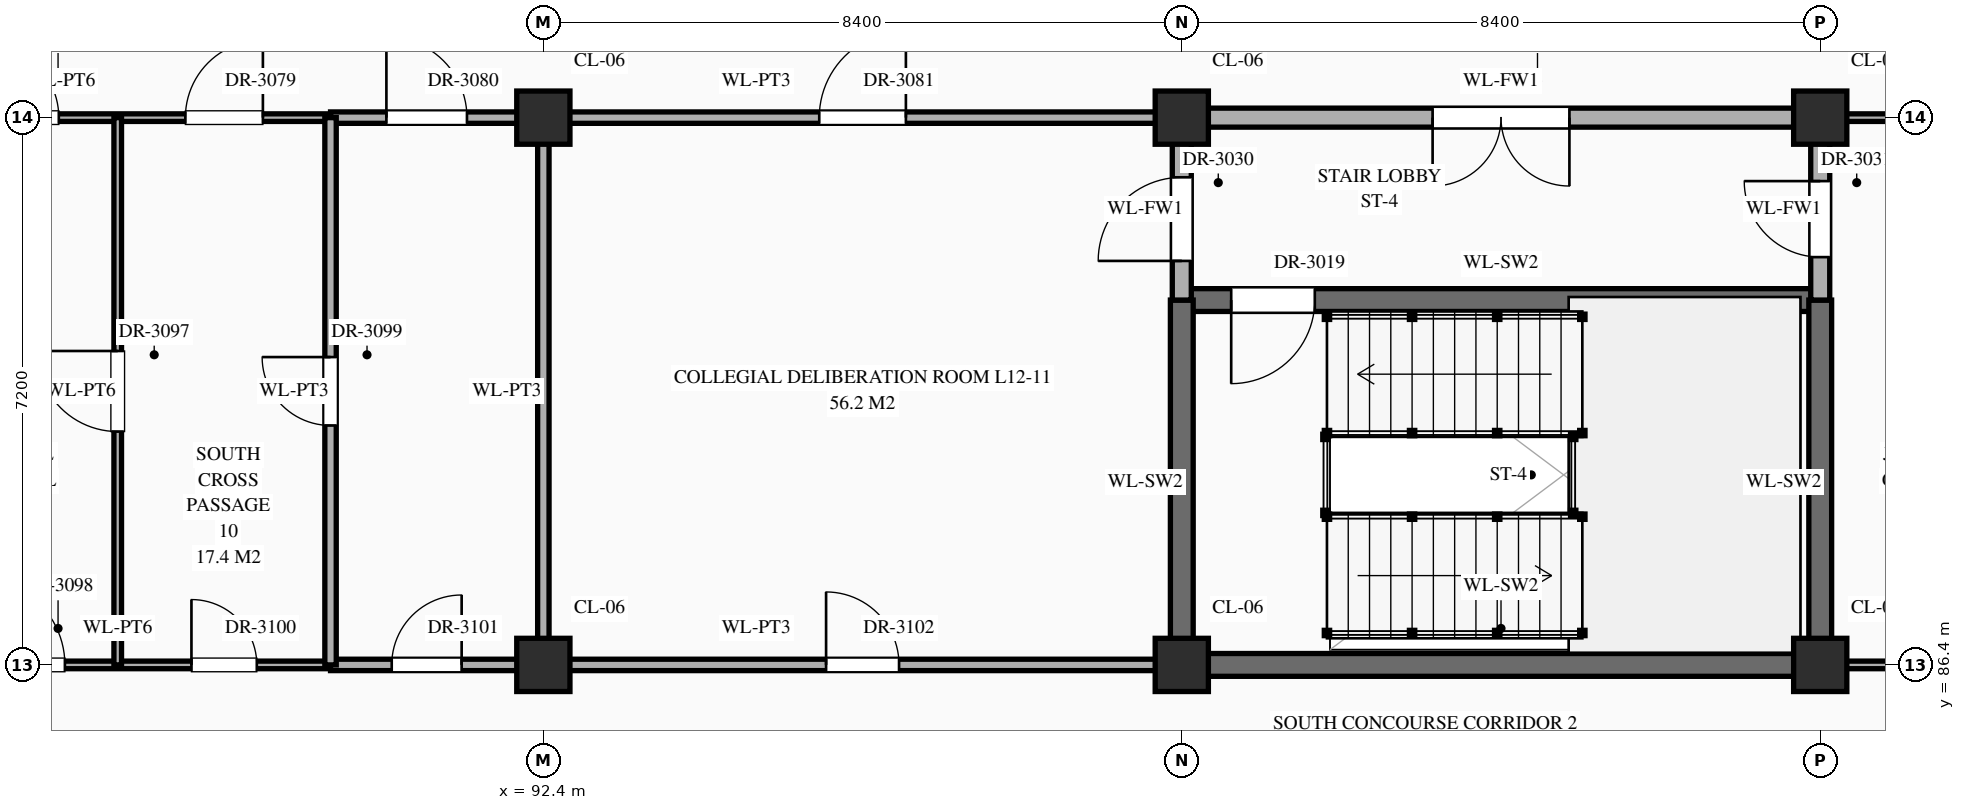
"""IFC4 building model, lengths in metres.
Left out: names, types, materials, properties, quantities, classifications, styles, units other than length and angle.
Written with IfcOpenShell. Run it as: python <this file> out.ifc"""

import sys

from ifc_helpers import new_model, si_unit, direction, frame, frame_2d, origin, origin_2d, place, context, subcontext, project, spatial, rectangle, extrude, element, fill, save


model = new_model("IFC4")
c1 = context("Model", 3, precision=1e-05, world=origin(), true_north=direction((0.0, 1.0)))
c2 = subcontext(c1, "Body", "Model", "MODEL_VIEW")
j1 = project(units=[si_unit("LENGTHUNIT", "METRE"), si_unit("PLANEANGLEUNIT", "RADIAN")], contexts=[c1])
p1 = place(None, origin())
s1 = spatial("IfcSite", under=j1, at=p1, CompositionType="ELEMENT")
p2 = place(p1, origin())
s2 = spatial("IfcBuilding", under=s1, at=p2, CompositionType="ELEMENT")
p3 = place(p2, frame((0.0, 0.0, 51.9)))
s3 = spatial("IfcBuildingStorey", under=s2, at=p3, CompositionType="ELEMENT", Elevation=51.9)
for number, where, z_axis, x_axis in (
    (1, (92.4, 86.4, 0.0), (0.0, 0.0, 1.0), (1.0, 0.0, 0.0)),
    (2, (92.4, 93.6, 0.0), (0.0, 0.0, 1.0), (1.0, 0.0, 0.0)),
    (3, (100.8, 86.4, 0.0), (0.0, 0.0, 1.0), (1.0, 0.0, 0.0)),
    (4, (100.8, 93.6, 0.0), (0.0, 0.0, 1.0), (1.0, 0.0, 0.0)),
    (5, (109.2, 86.4, 0.0), (0.0, 0.0, 1.0), (1.0, 0.0, 0.0)),
    (6, (109.2, 93.6, 0.0), (0.0, 0.0, 1.0), (1.0, 0.0, 0.0)),
):
    element("IfcColumn", number, at=place(p3, frame(where, z_axis=z_axis, x_axis=x_axis)), inside=s3, PredefinedType="COLUMN", context=c2, shape_type="SweptSolid", body=[
        extrude(rectangle(XDim=0.7, YDim=0.7, at=origin_2d()), origin(), (0.0, 0.0, 1.0), 4.2),
    ])
p4 = place(p3, frame((84.0, 86.4, 0.0), z_axis=(0.0, 0.0, 1.0), x_axis=(1.0, 0.0, 0.0)))
e7 = element("IfcWall", 7, at=p4, inside=s3, PredefinedType="STANDARD", context=c2, shape_type="SweptSolid", body=[
    extrude(rectangle(XDim=5.6, YDim=0.1, at=frame_2d((2.8, 0.0))), origin(), (0.0, 0.0, 1.0), 3.11),
])
p5 = place(p4, frame((0.965, 0.0, 0.0)))
e8 = element("IfcOpeningElement", 8, at=p5, cuts=e7, PredefinedType="OPENING", context=c2, shape_type="SweptSolid", body=[
    extrude(rectangle(XDim=1.14, YDim=2.4, at=frame_2d((0.57, 1.2))), frame((0.0, 0.062, 0.0), z_axis=(0.0, -1.0, 0.0), x_axis=(1.0, 0.0, 0.0)), (0.0, 0.0, 1.0), 0.124),
])
p6 = place(p4, frame((3.77, 0.0, 0.0)))
e9 = element("IfcOpeningElement", 9, at=p6, cuts=e7, PredefinedType="OPENING", context=c2, shape_type="SweptSolid", body=[
    extrude(rectangle(XDim=0.86, YDim=2.1, at=frame_2d((0.43, 1.05))), frame((0.0, 0.062, 0.0), z_axis=(0.0, -1.0, 0.0), x_axis=(1.0, 0.0, 0.0)), (0.0, 0.0, 1.0), 0.124),
])
p7 = place(p3, frame((89.6, 86.4, 0.0), z_axis=(0.0, 0.0, 1.0), x_axis=(1.0, 0.0, 0.0)))
e10 = element("IfcWall", 10, at=p7, inside=s3, PredefinedType="STANDARD", context=c2, shape_type="SweptSolid", body=[
    extrude(rectangle(XDim=11.2, YDim=0.15, at=frame_2d((5.6, 0.0))), origin(), (0.0, 0.0, 1.0), 3.11),
])
p8 = place(p7, frame((0.805, 0.0, 0.0)))
e11 = element("IfcOpeningElement", 11, at=p8, cuts=e10, PredefinedType="OPENING", context=c2, shape_type="SweptSolid", body=[
    extrude(rectangle(XDim=0.92, YDim=2.15, at=frame_2d((0.46, 1.075))), frame((0.0, 0.087, 0.0), z_axis=(0.0, -1.0, 0.0), x_axis=(1.0, 0.0, 0.0)), (0.0, 0.0, 1.0), 0.174),
])
p9 = place(p7, frame((6.52, 0.0, 0.0)))
e12 = element("IfcOpeningElement", 12, at=p9, cuts=e10, PredefinedType="OPENING", context=c2, shape_type="SweptSolid", body=[
    extrude(rectangle(XDim=0.96, YDim=2.2, at=frame_2d((0.48, 1.1))), frame((0.0, 0.087, 0.0), z_axis=(0.0, -1.0, 0.0), x_axis=(1.0, 0.0, 0.0)), (0.0, 0.0, 1.0), 0.174),
])
p10 = place(p3, frame((100.8, 86.4, 0.0), z_axis=(0.0, 0.0, 1.0), x_axis=(1.0, 0.0, 0.0)))
e13 = element("IfcWall", 13, at=p10, inside=s3, PredefinedType="SHEAR", context=c2, shape_type="SweptSolid", body=[
    extrude(rectangle(XDim=8.4, YDim=0.3, at=frame_2d((4.2, 0.0))), origin(), (0.0, 0.0, 1.0), 3.96),
])
p11 = place(p3, frame((109.2, 86.4, 0.0), z_axis=(0.0, 0.0, 1.0), x_axis=(1.0, 0.0, 0.0)))
e14 = element("IfcWall", 14, at=p11, inside=s3, PredefinedType="STANDARD", context=c2, shape_type="SweptSolid", body=[
    extrude(rectangle(XDim=5.6, YDim=0.1, at=frame_2d((2.8, 0.0))), origin(), (0.0, 0.0, 1.0), 3.11),
])
p12 = place(p11, frame((1.015, 0.0, 0.0)))
e15 = element("IfcOpeningElement", 15, at=p12, cuts=e14, PredefinedType="OPENING", context=c2, shape_type="SweptSolid", body=[
    extrude(rectangle(XDim=1.04, YDim=2.2, at=frame_2d((0.52, 1.1))), frame((0.0, 0.062, 0.0), z_axis=(0.0, -1.0, 0.0), x_axis=(1.0, 0.0, 0.0)), (0.0, 0.0, 1.0), 0.124),
])
p13 = place(p11, frame((3.64, 0.0, 0.0)))
e16 = element("IfcOpeningElement", 16, at=p13, cuts=e14, PredefinedType="OPENING", context=c2, shape_type="SweptSolid", body=[
    extrude(rectangle(XDim=1.12, YDim=2.25, at=frame_2d((0.56, 1.125))), frame((0.0, 0.062, 0.0), z_axis=(0.0, -1.0, 0.0), x_axis=(1.0, 0.0, 0.0)), (0.0, 0.0, 1.0), 0.124),
])
p14 = place(p3, frame((100.8, 91.2, 0.0), z_axis=(0.0, 0.0, 1.0), x_axis=(1.0, 0.0, 0.0)))
e17 = element("IfcWall", 17, at=p14, inside=s3, PredefinedType="SHEAR", context=c2, shape_type="SweptSolid", body=[
    extrude(rectangle(XDim=8.4, YDim=0.3, at=frame_2d((4.2, 0.0))), origin(), (0.0, 0.0, 1.0), 3.96),
])
p15 = place(p14, frame((0.65, 0.0, 0.0)))
e18 = element("IfcOpeningElement", 18, at=p15, cuts=e17, PredefinedType="OPENING", context=c2, shape_type="SweptSolid", body=[
    extrude(rectangle(XDim=1.1, YDim=2.2, at=frame_2d((0.55, 1.1))), frame((0.0, 0.162, 0.0), z_axis=(0.0, -1.0, 0.0), x_axis=(1.0, 0.0, 0.0)), (0.0, 0.0, 1.0), 0.324),
])
p16 = place(p3, frame((75.6, 93.6, 0.0), z_axis=(0.0, 0.0, 1.0), x_axis=(1.0, 0.0, 0.0)))
e19 = element("IfcWall", 19, at=p16, inside=s3, PredefinedType="STANDARD", context=c2, shape_type="SweptSolid", body=[
    extrude(rectangle(XDim=14.0, YDim=0.1, at=frame_2d((7.0, 0.0))), origin(), (0.0, 0.0, 1.0), 3.11),
])
p17 = place(p16, frame((3.425, 0.0, 0.0)))
e20 = element("IfcOpeningElement", 20, at=p17, cuts=e19, PredefinedType="OPENING", context=c2, shape_type="SweptSolid", body=[
    extrude(rectangle(XDim=1.55, YDim=2.35, at=frame_2d((0.775, 1.175))), frame((0.0, 0.062, 0.0), z_axis=(0.0, -1.0, 0.0), x_axis=(1.0, 0.0, 0.0)), (0.0, 0.0, 1.0), 0.124),
])
p18 = place(p16, frame((9.445, 0.0, 0.0)))
e21 = element("IfcOpeningElement", 21, at=p18, cuts=e19, PredefinedType="OPENING", context=c2, shape_type="SweptSolid", body=[
    extrude(rectangle(XDim=0.98, YDim=2.35, at=frame_2d((0.49, 1.175))), frame((0.0, 0.062, 0.0), z_axis=(0.0, -1.0, 0.0), x_axis=(1.0, 0.0, 0.0)), (0.0, 0.0, 1.0), 0.124),
])
p19 = place(p16, frame((12.09, 0.0, 0.0)))
e22 = element("IfcOpeningElement", 22, at=p19, cuts=e19, PredefinedType="OPENING", context=c2, shape_type="SweptSolid", body=[
    extrude(rectangle(XDim=1.02, YDim=2.4, at=frame_2d((0.51, 1.2))), frame((0.0, 0.062, 0.0), z_axis=(0.0, -1.0, 0.0), x_axis=(1.0, 0.0, 0.0)), (0.0, 0.0, 1.0), 0.124),
])
p20 = place(p3, frame((89.6, 93.6, 0.0), z_axis=(0.0, 0.0, 1.0), x_axis=(1.0, 0.0, 0.0)))
e23 = element("IfcWall", 23, at=p20, inside=s3, PredefinedType="STANDARD", context=c2, shape_type="SweptSolid", body=[
    extrude(rectangle(XDim=11.2, YDim=0.15, at=frame_2d((5.6, 0.0))), origin(), (0.0, 0.0, 1.0), 3.11),
])
p21 = place(p20, frame((0.735, 0.0, 0.0)))
e24 = element("IfcOpeningElement", 24, at=p21, cuts=e23, PredefinedType="OPENING", context=c2, shape_type="SweptSolid", body=[
    extrude(rectangle(XDim=1.06, YDim=2.4, at=frame_2d((0.53, 1.2))), frame((0.0, 0.087, 0.0), z_axis=(0.0, -1.0, 0.0), x_axis=(1.0, 0.0, 0.0)), (0.0, 0.0, 1.0), 0.174),
])
p22 = place(p20, frame((6.43, 0.0, 0.0)))
e25 = element("IfcOpeningElement", 25, at=p22, cuts=e23, PredefinedType="OPENING", context=c2, shape_type="SweptSolid", body=[
    extrude(rectangle(XDim=1.14, YDim=2.4, at=frame_2d((0.57, 1.2))), frame((0.0, 0.087, 0.0), z_axis=(0.0, -1.0, 0.0), x_axis=(1.0, 0.0, 0.0)), (0.0, 0.0, 1.0), 0.174),
])
p23 = place(p3, frame((100.8, 93.6, 0.0), z_axis=(0.0, 0.0, 1.0), x_axis=(1.0, 0.0, 0.0)))
e26 = element("IfcWall", 26, at=p23, inside=s3, PredefinedType="STANDARD", context=c2, shape_type="SweptSolid", body=[
    extrude(rectangle(XDim=8.4, YDim=0.25, at=frame_2d((4.2, 0.0))), origin(), (0.0, 0.0, 1.0), 3.11),
])
p24 = place(p23, frame((3.3, 0.0, 0.0)))
e27 = element("IfcOpeningElement", 27, at=p24, cuts=e26, PredefinedType="OPENING", context=c2, shape_type="SweptSolid", body=[
    extrude(rectangle(XDim=1.8, YDim=2.35, at=frame_2d((0.9, 1.175))), frame((0.0, 0.137, 0.0), z_axis=(0.0, -1.0, 0.0), x_axis=(1.0, 0.0, 0.0)), (0.0, 0.0, 1.0), 0.274),
])
p25 = place(p3, frame((109.2, 93.6, 0.0), z_axis=(0.0, 0.0, 1.0), x_axis=(1.0, 0.0, 0.0)))
e28 = element("IfcWall", 28, at=p25, inside=s3, PredefinedType="STANDARD", context=c2, shape_type="SweptSolid", body=[
    extrude(rectangle(XDim=5.6, YDim=0.1, at=frame_2d((2.8, 0.0))), origin(), (0.0, 0.0, 1.0), 3.11),
])
p26 = place(p25, frame((1.085, 0.0, 0.0)))
e29 = element("IfcOpeningElement", 29, at=p26, cuts=e28, PredefinedType="OPENING", context=c2, shape_type="SweptSolid", body=[
    extrude(rectangle(XDim=0.9, YDim=2.15, at=frame_2d((0.45, 1.075))), frame((0.0, 0.062, 0.0), z_axis=(0.0, -1.0, 0.0), x_axis=(1.0, 0.0, 0.0)), (0.0, 0.0, 1.0), 0.124),
])
p27 = place(p25, frame((3.77, 0.0, 0.0)))
e30 = element("IfcOpeningElement", 30, at=p27, cuts=e28, PredefinedType="OPENING", context=c2, shape_type="SweptSolid", body=[
    extrude(rectangle(XDim=0.86, YDim=2.1, at=frame_2d((0.43, 1.05))), frame((0.0, 0.062, 0.0), z_axis=(0.0, -1.0, 0.0), x_axis=(1.0, 0.0, 0.0)), (0.0, 0.0, 1.0), 0.124),
])
p28 = place(p3, frame((86.8, 86.4, 0.0), z_axis=(0.0, 0.0, 1.0), x_axis=(0.0, 1.0, 0.0)))
e31 = element("IfcWall", 31, at=p28, inside=s3, PredefinedType="STANDARD", context=c2, shape_type="SweptSolid", body=[
    extrude(rectangle(XDim=7.2, YDim=0.1, at=frame_2d((3.6, 0.0))), origin(), (0.0, 0.0, 1.0), 3.96),
])
p29 = place(p28, frame((3.07, 0.0, 0.0)))
e32 = element("IfcOpeningElement", 32, at=p29, cuts=e31, PredefinedType="OPENING", context=c2, shape_type="SweptSolid", body=[
    extrude(rectangle(XDim=1.06, YDim=2.4, at=frame_2d((0.53, 1.2))), frame((0.0, 0.062, 0.0), z_axis=(0.0, -1.0, 0.0), x_axis=(1.0, 0.0, 0.0)), (0.0, 0.0, 1.0), 0.124),
])
p30 = place(p3, frame((89.6, 86.4, 0.0), z_axis=(0.0, 0.0, 1.0), x_axis=(0.0, 1.0, 0.0)))
e33 = element("IfcWall", 33, at=p30, inside=s3, PredefinedType="STANDARD", context=c2, shape_type="SweptSolid", body=[
    extrude(rectangle(XDim=7.2, YDim=0.15, at=frame_2d((3.6, 0.0))), origin(), (0.0, 0.0, 1.0), 3.96),
])
p31 = place(p30, frame((3.15, 0.0, 0.0)))
e34 = element("IfcOpeningElement", 34, at=p31, cuts=e33, PredefinedType="OPENING", context=c2, shape_type="SweptSolid", body=[
    extrude(rectangle(XDim=0.9, YDim=2.15, at=frame_2d((0.45, 1.075))), frame((0.0, 0.087, 0.0), z_axis=(0.0, -1.0, 0.0), x_axis=(1.0, 0.0, 0.0)), (0.0, 0.0, 1.0), 0.174),
])
p32 = place(p3, frame((92.4, 86.4, 0.0), z_axis=(0.0, 0.0, 1.0), x_axis=(0.0, 1.0, 0.0)))
e35 = element("IfcWall", 35, at=p32, inside=s3, PredefinedType="STANDARD", context=c2, shape_type="SweptSolid", body=[
    extrude(rectangle(XDim=7.2, YDim=0.15, at=frame_2d((3.6, 0.0))), origin(), (0.0, 0.0, 1.0), 3.21),
])
p33 = place(p3, frame((100.8, 86.4, 0.0), z_axis=(0.0, 0.0, 1.0), x_axis=(0.0, 1.0, 0.0)))
e36 = element("IfcWall", 36, at=p33, inside=s3, PredefinedType="SHEAR", context=c2, shape_type="SweptSolid", body=[
    extrude(rectangle(XDim=4.8, YDim=0.3, at=frame_2d((2.4, 0.0))), origin(), (0.0, 0.0, 1.0), 3.96),
])
p34 = place(p3, frame((100.8, 91.2, 0.0), z_axis=(0.0, 0.0, 1.0), x_axis=(0.0, 1.0, 0.0)))
e37 = element("IfcWall", 37, at=p34, inside=s3, PredefinedType="STANDARD", context=c2, shape_type="SweptSolid", body=[
    extrude(rectangle(XDim=2.4, YDim=0.25, at=frame_2d((1.2, 0.0))), origin(), (0.0, 0.0, 1.0), 3.21),
])
p35 = place(p34, frame((0.515, 0.0, 0.0)))
e38 = element("IfcOpeningElement", 38, at=p35, cuts=e37, PredefinedType="OPENING", context=c2, shape_type="SweptSolid", body=[
    extrude(rectangle(XDim=1.1, YDim=2.2, at=frame_2d((0.55, 1.1))), frame((0.0, 0.137, 0.0), z_axis=(0.0, -1.0, 0.0), x_axis=(1.0, 0.0, 0.0)), (0.0, 0.0, 1.0), 0.274),
])
p36 = place(p3, frame((109.2, 86.4, 0.0), z_axis=(0.0, 0.0, 1.0), x_axis=(0.0, 1.0, 0.0)))
e39 = element("IfcWall", 39, at=p36, inside=s3, PredefinedType="SHEAR", context=c2, shape_type="SweptSolid", body=[
    extrude(rectangle(XDim=4.8, YDim=0.3, at=frame_2d((2.4, 0.0))), origin(), (0.0, 0.0, 1.0), 3.96),
])
p37 = place(p3, frame((109.2, 91.2, 0.0), z_axis=(0.0, 0.0, 1.0), x_axis=(0.0, 1.0, 0.0)))
e40 = element("IfcWall", 40, at=p37, inside=s3, PredefinedType="STANDARD", context=c2, shape_type="SweptSolid", body=[
    extrude(rectangle(XDim=2.4, YDim=0.25, at=frame_2d((1.2, 0.0))), origin(), (0.0, 0.0, 1.0), 3.21),
])
p38 = place(p37, frame((0.565, 0.0, 0.0)))
e41 = element("IfcOpeningElement", 41, at=p38, cuts=e40, PredefinedType="OPENING", context=c2, shape_type="SweptSolid", body=[
    extrude(rectangle(XDim=1.0, YDim=2.2, at=frame_2d((0.5, 1.1))), frame((0.0, 0.137, 0.0), z_axis=(0.0, -1.0, 0.0), x_axis=(1.0, 0.0, 0.0)), (0.0, 0.0, 1.0), 0.274),
])
p39 = place(p15, frame((1.1, 0.0, 0.0), z_axis=(0.0, 0.0, 1.0), x_axis=(-1.0, 0.0, 0.0)))
e42 = element("IfcDoor", 42, at=p39, inside=s3, OperationType="SINGLE_SWING_RIGHT", PredefinedType="DOOR", context=c2, shape_type="SweptSolid", body=[
    extrude(rectangle(XDim=1.1, YDim=2.2, at=frame_2d((0.55, 1.1))), frame((0.0, 0.025, 0.0), z_axis=(0.0, -1.0, 0.0), x_axis=(1.0, 0.0, 0.0)), (0.0, 0.0, 1.0), 0.05),
])
fill(e18, e42)
p40 = place(p24, frame((1.8, 0.0, 0.0), z_axis=(0.0, 0.0, 1.0), x_axis=(-1.0, 0.0, 0.0)))
e43 = element("IfcDoor", 43, at=p40, inside=s3, OperationType="DOUBLE_DOOR_SINGLE_SWING", PredefinedType="DOOR", context=c2, shape_type="SweptSolid", body=[
    extrude(rectangle(XDim=1.8, YDim=2.35, at=frame_2d((0.9, 1.175))), frame((0.0, 0.025, 0.0), z_axis=(0.0, -1.0, 0.0), x_axis=(1.0, 0.0, 0.0)), (0.0, 0.0, 1.0), 0.05),
])
fill(e27, e43)
p41 = place(p35, origin())
e44 = element("IfcDoor", 44, at=p41, inside=s3, OperationType="SINGLE_SWING_LEFT", PredefinedType="DOOR", context=c2, shape_type="SweptSolid", body=[
    extrude(rectangle(XDim=1.1, YDim=2.2, at=frame_2d((0.55, 1.1))), frame((0.0, 0.025, 0.0), z_axis=(0.0, -1.0, 0.0), x_axis=(1.0, 0.0, 0.0)), (0.0, 0.0, 1.0), 0.05),
])
fill(e38, e44)
p42 = place(p38, origin())
e45 = element("IfcDoor", 45, at=p42, inside=s3, OperationType="SINGLE_SWING_RIGHT", PredefinedType="DOOR", context=c2, shape_type="SweptSolid", body=[
    extrude(rectangle(XDim=1.0, YDim=2.2, at=frame_2d((0.5, 1.1))), frame((0.0, 0.025, 0.0), z_axis=(0.0, -1.0, 0.0), x_axis=(1.0, 0.0, 0.0)), (0.0, 0.0, 1.0), 0.05),
])
fill(e41, e45)
p43 = place(p18, origin())
e46 = element("IfcDoor", 46, at=p43, inside=s3, OperationType="SINGLE_SWING_LEFT", PredefinedType="DOOR", context=c2, shape_type="SweptSolid", body=[
    extrude(rectangle(XDim=0.98, YDim=2.35, at=frame_2d((0.49, 1.175))), frame((0.0, 0.025, 0.0), z_axis=(0.0, -1.0, 0.0), x_axis=(1.0, 0.0, 0.0)), (0.0, 0.0, 1.0), 0.05),
])
fill(e21, e46)
p44 = place(p19, origin())
e47 = element("IfcDoor", 47, at=p44, inside=s3, OperationType="SINGLE_SWING_RIGHT", PredefinedType="DOOR", context=c2, shape_type="SweptSolid", body=[
    extrude(rectangle(XDim=1.02, YDim=2.4, at=frame_2d((0.51, 1.2))), frame((0.0, 0.025, 0.0), z_axis=(0.0, -1.0, 0.0), x_axis=(1.0, 0.0, 0.0)), (0.0, 0.0, 1.0), 0.05),
])
fill(e22, e47)
p45 = place(p21, origin())
e48 = element("IfcDoor", 48, at=p45, inside=s3, OperationType="SINGLE_SWING_LEFT", PredefinedType="DOOR", context=c2, shape_type="SweptSolid", body=[
    extrude(rectangle(XDim=1.06, YDim=2.4, at=frame_2d((0.53, 1.2))), frame((0.0, 0.025, 0.0), z_axis=(0.0, -1.0, 0.0), x_axis=(1.0, 0.0, 0.0)), (0.0, 0.0, 1.0), 0.05),
])
fill(e24, e48)
p46 = place(p22, origin())
e49 = element("IfcDoor", 49, at=p46, inside=s3, OperationType="SINGLE_SWING_RIGHT", PredefinedType="DOOR", context=c2, shape_type="SweptSolid", body=[
    extrude(rectangle(XDim=1.14, YDim=2.4, at=frame_2d((0.57, 1.2))), frame((0.0, 0.025, 0.0), z_axis=(0.0, -1.0, 0.0), x_axis=(1.0, 0.0, 0.0)), (0.0, 0.0, 1.0), 0.05),
])
fill(e25, e49)
p47 = place(p29, origin())
e50 = element("IfcDoor", 50, at=p47, inside=s3, OperationType="SINGLE_SWING_RIGHT", PredefinedType="DOOR", context=c2, shape_type="SweptSolid", body=[
    extrude(rectangle(XDim=1.06, YDim=2.4, at=frame_2d((0.53, 1.2))), frame((0.0, 0.025, 0.0), z_axis=(0.0, -1.0, 0.0), x_axis=(1.0, 0.0, 0.0)), (0.0, 0.0, 1.0), 0.05),
])
fill(e32, e50)
p48 = place(p5, origin())
e51 = element("IfcDoor", 51, at=p48, inside=s3, OperationType="SINGLE_SWING_LEFT", PredefinedType="DOOR", context=c2, shape_type="SweptSolid", body=[
    extrude(rectangle(XDim=1.14, YDim=2.4, at=frame_2d((0.57, 1.2))), frame((0.0, 0.025, 0.0), z_axis=(0.0, -1.0, 0.0), x_axis=(1.0, 0.0, 0.0)), (0.0, 0.0, 1.0), 0.05),
])
fill(e8, e51)
p49 = place(p31, origin())
e52 = element("IfcDoor", 52, at=p49, inside=s3, OperationType="SINGLE_SWING_RIGHT", PredefinedType="DOOR", context=c2, shape_type="SweptSolid", body=[
    extrude(rectangle(XDim=0.9, YDim=2.15, at=frame_2d((0.45, 1.075))), frame((0.0, 0.025, 0.0), z_axis=(0.0, -1.0, 0.0), x_axis=(1.0, 0.0, 0.0)), (0.0, 0.0, 1.0), 0.05),
])
fill(e34, e52)
p50 = place(p6, origin())
e53 = element("IfcDoor", 53, at=p50, inside=s3, OperationType="SINGLE_SWING_LEFT", PredefinedType="DOOR", context=c2, shape_type="SweptSolid", body=[
    extrude(rectangle(XDim=0.86, YDim=2.1, at=frame_2d((0.43, 1.05))), frame((0.0, 0.025, 0.0), z_axis=(0.0, -1.0, 0.0), x_axis=(1.0, 0.0, 0.0)), (0.0, 0.0, 1.0), 0.05),
])
fill(e9, e53)
p51 = place(p8, origin())
e54 = element("IfcDoor", 54, at=p51, inside=s3, OperationType="SINGLE_SWING_RIGHT", PredefinedType="DOOR", context=c2, shape_type="SweptSolid", body=[
    extrude(rectangle(XDim=0.92, YDim=2.15, at=frame_2d((0.46, 1.075))), frame((0.0, 0.025, 0.0), z_axis=(0.0, -1.0, 0.0), x_axis=(1.0, 0.0, 0.0)), (0.0, 0.0, 1.0), 0.05),
])
fill(e11, e54)
p52 = place(p9, origin())
e55 = element("IfcDoor", 55, at=p52, inside=s3, OperationType="SINGLE_SWING_LEFT", PredefinedType="DOOR", context=c2, shape_type="SweptSolid", body=[
    extrude(rectangle(XDim=0.96, YDim=2.2, at=frame_2d((0.48, 1.1))), frame((0.0, 0.025, 0.0), z_axis=(0.0, -1.0, 0.0), x_axis=(1.0, 0.0, 0.0)), (0.0, 0.0, 1.0), 0.05),
])
fill(e12, e55)
save(model, sys.argv[1])
